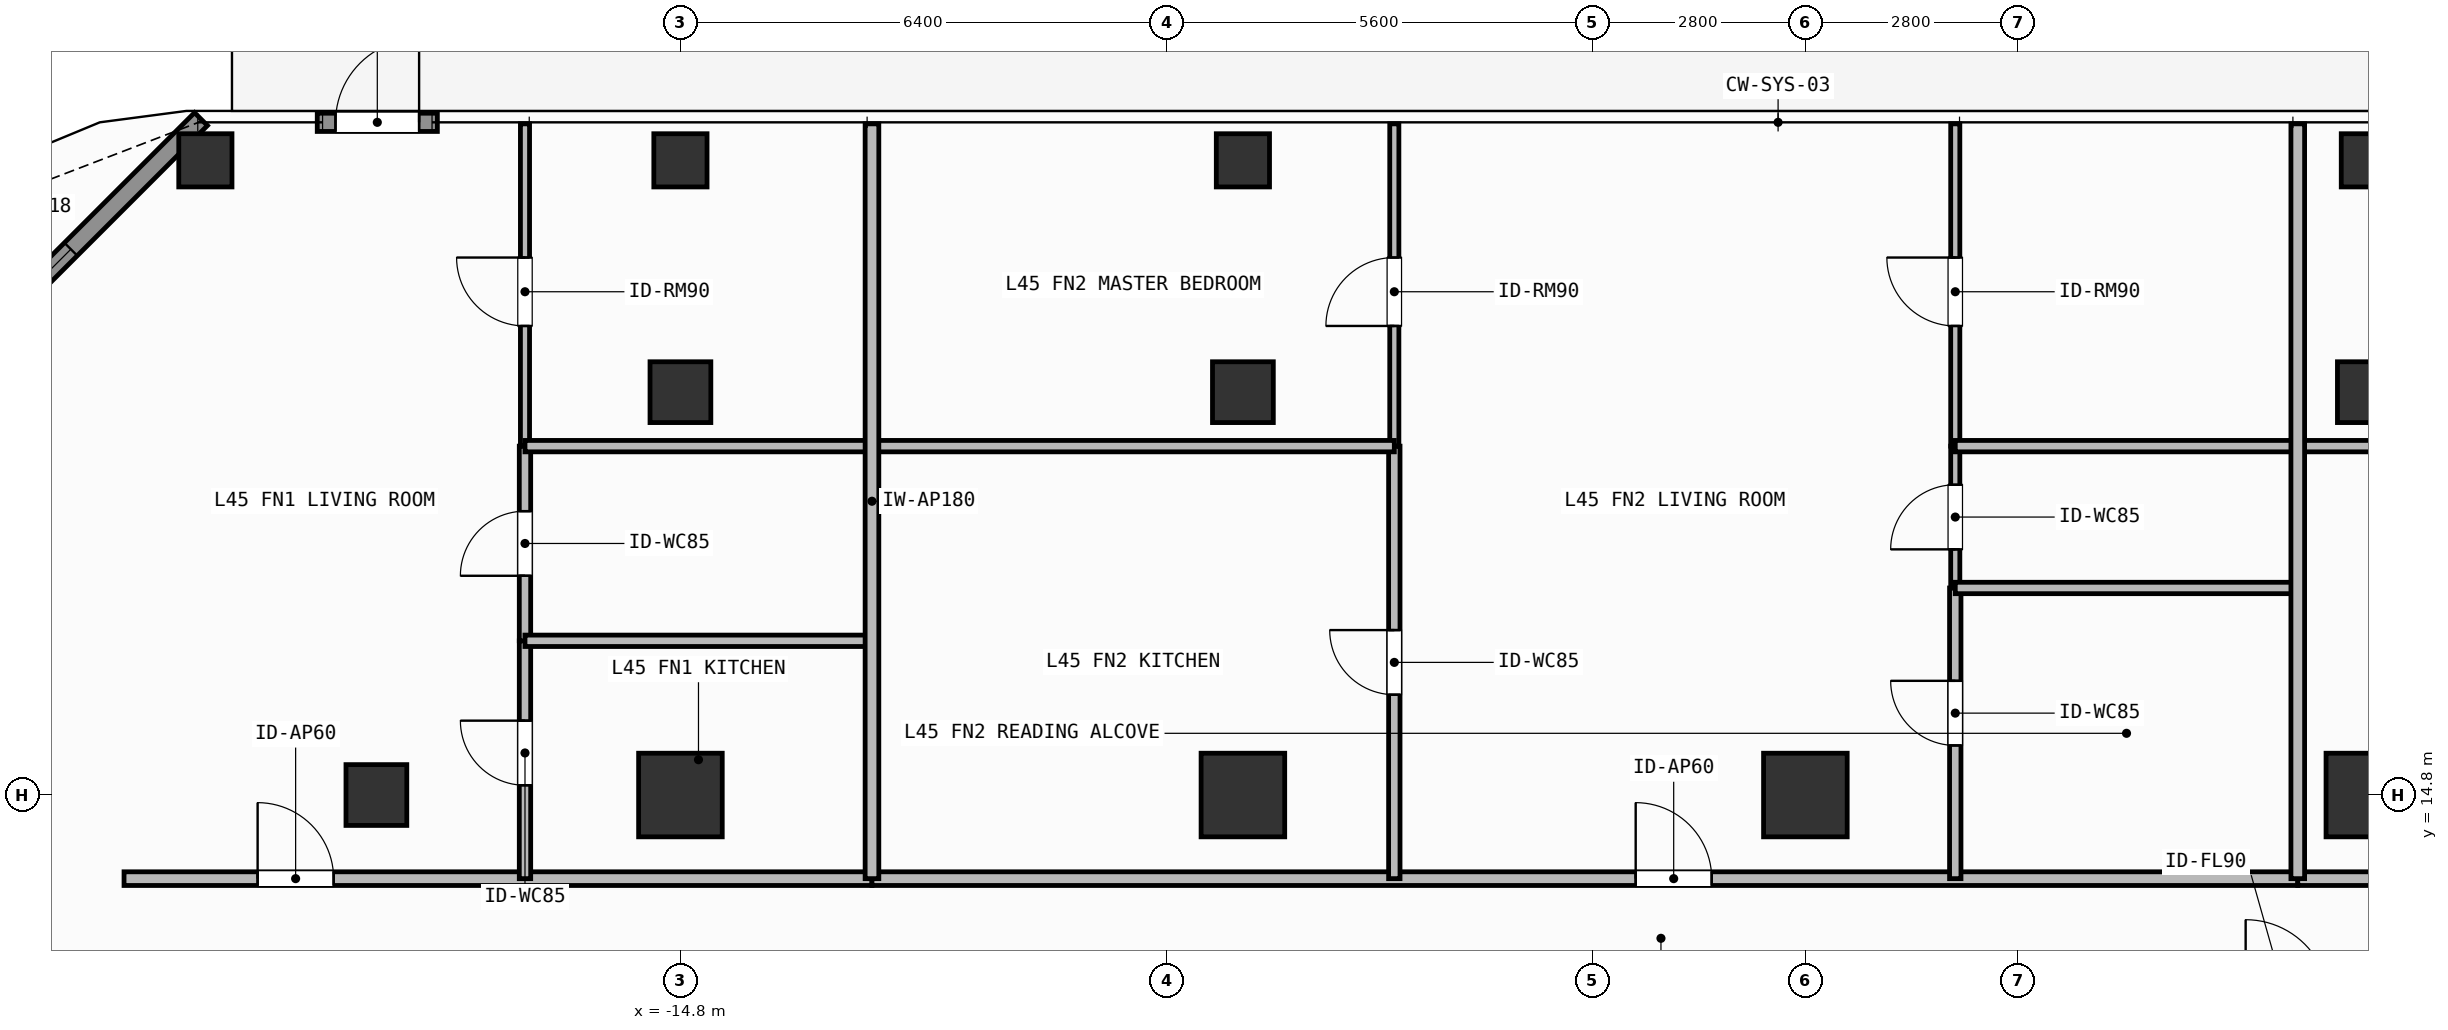
"""IFC4 building model, lengths in metres.
Left out: names, types, materials, properties, quantities, classifications, styles, units other than length and angle.
Written with IfcOpenShell. Run it as: python <this file> out.ifc"""

import sys

from ifc_helpers import new_model, si_unit, direction, frame, frame_2d, origin, origin_2d, place, context, subcontext, project, spatial, rectangle, hollow_rectangle, extrude, element, fill, save


model = new_model("IFC4")
c1 = context("Model", 3, precision=1e-05, world=origin(), true_north=direction((0.0, 1.0)))
c2 = subcontext(c1, "Body", "Model", "MODEL_VIEW")
j1 = project(units=[si_unit("LENGTHUNIT", "METRE"), si_unit("PLANEANGLEUNIT", "RADIAN")], contexts=[c1])
p1 = place(None, origin())
s1 = spatial("IfcSite", under=j1, at=p1, CompositionType="ELEMENT")
p2 = place(p1, origin())
s2 = spatial("IfcBuilding", under=s1, at=p2, CompositionType="ELEMENT")
p3 = place(p2, frame((0.0, 0.0, 183.6)))
s3 = spatial("IfcBuildingStorey", under=s2, at=p3, CompositionType="ELEMENT", Elevation=183.6)
for number, where, z_axis, x_axis in (
    (1, (-14.8, 14.8, 0.0), (0.0, 0.0, 1.0), (1.0, 0.0, 0.0)),
    (2, (-7.4, 14.8, 0.0), (0.0, 0.0, 1.0), (1.0, 0.0, 0.0)),
    (3, (0.0, 14.8, 0.0), (0.0, 0.0, 1.0), (1.0, 0.0, 0.0)),
    (4, (7.4, 14.8, 0.0), (0.0, 0.0, 1.0), (1.0, 0.0, 0.0)),
):
    element("IfcColumn", number, at=place(p3, frame(where, z_axis=z_axis, x_axis=x_axis)), inside=s3, PredefinedType="COLUMN", context=c2, shape_type="SweptSolid", body=[
        extrude(rectangle(XDim=1.1, YDim=1.1, at=origin_2d()), origin(), (0.0, 0.0, 1.0), 3.9),
    ])
for number, where, z_axis, x_axis in (
    (5, (-18.8, 14.8, 0.0), (0.0, 0.0, 1.0), (1.0, 0.0, 0.0)),
    (6, (-14.8, 20.1, 0.0), (0.0, 0.0, 1.0), (1.0, 0.0, 0.0)),
    (7, (-7.4, 20.1, 0.0), (0.0, 0.0, 1.0), (1.0, 0.0, 0.0)),
    (8, (7.4, 20.1, 0.0), (0.0, 0.0, 1.0), (1.0, 0.0, 0.0)),
):
    element("IfcColumn", number, at=place(p3, frame(where, z_axis=z_axis, x_axis=x_axis)), inside=s3, PredefinedType="COLUMN", context=c2, shape_type="SweptSolid", body=[
        extrude(hollow_rectangle(XDim=0.8, YDim=0.8, WallThickness=0.036, at=origin_2d()), origin(), (0.0, 0.0, 1.0), 3.9),
    ])
for number, where, z_axis, x_axis in (
    (9, (-21.05, 23.15, 0.0), (0.0, 0.0, 1.0), (1.0, 0.0, 0.0)),
    (10, (-14.8, 23.15, 0.0), (0.0, 0.0, 1.0), (1.0, 0.0, 0.0)),
    (11, (-7.4, 23.15, 0.0), (0.0, 0.0, 1.0), (1.0, 0.0, 0.0)),
    (12, (7.4, 23.15, 0.0), (0.0, 0.0, 1.0), (1.0, 0.0, 0.0)),
):
    element("IfcColumn", number, at=place(p3, frame(where, z_axis=z_axis, x_axis=x_axis)), inside=s3, PredefinedType="COLUMN", context=c2, shape_type="SweptSolid", body=[
        extrude(hollow_rectangle(XDim=0.7, YDim=0.7, WallThickness=0.032, at=origin_2d()), origin(), (0.0, 0.0, 1.0), 3.9),
    ])
p4 = place(p3, frame((-19.578, 23.65, 0.0), z_axis=(0.0, 0.0, 1.0), x_axis=(1.0, 0.0, 0.0)))
e13 = element("IfcWall", 13, at=p4, inside=s3, PredefinedType="SOLIDWALL", context=c2, shape_type="SweptSolid", body=[
    extrude(rectangle(XDim=1.58, YDim=0.24, at=frame_2d((0.79, 0.0))), origin(), (0.0, 0.0, 1.0), 3.68),
])
p5 = place(p4, frame((0.24, 0.0, 0.0)))
e14 = element("IfcOpeningElement", 14, at=p5, cuts=e13, PredefinedType="OPENING", context=c2, shape_type="SweptSolid", body=[
    extrude(rectangle(XDim=1.1, YDim=2.2, at=frame_2d((0.55, 1.1))), frame((0.0, 0.13, 0.0), z_axis=(0.0, -1.0, 0.0), x_axis=(1.0, 0.0, 0.0)), (0.0, 0.0, 1.0), 0.26),
])
p6 = place(p3, frame((-25.592, 19.208, 0.0), z_axis=(0.0, 0.0, 1.0), x_axis=(0.707087534163, 0.707126027686, 0.0)))
e15 = element("IfcWall", 15, at=p6, inside=s3, PredefinedType="SOLIDWALL", context=c2, shape_type="SweptSolid", body=[
    extrude(rectangle(XDim=6.342, YDim=0.24, at=frame_2d((3.171, 0.0))), origin(), (0.0, 0.0, 1.0), 3.68),
])
p7 = place(p6, frame((2.421, 0.0, 0.8)))
e16 = element("IfcOpeningElement", 16, at=p7, cuts=e15, PredefinedType="OPENING", context=c2, shape_type="SweptSolid", body=[
    extrude(rectangle(XDim=1.5, YDim=1.85, at=frame_2d((0.75, 0.925))), frame((0.0, 0.13, 0.0), z_axis=(0.0, -1.0, 0.0), x_axis=(1.0, 0.0, 0.0)), (0.0, 0.0, 1.0), 0.26),
])
p8 = place(p3, frame((-22.12, 13.7, 0.0), z_axis=(0.0, 0.0, 1.0), x_axis=(1.0, 0.0, 0.0)))
e17 = element("IfcWall", 17, at=p8, inside=s3, PredefinedType="PARTITIONING", context=c2, shape_type="SweptSolid", body=[
    extrude(rectangle(XDim=9.84, YDim=0.18, at=frame_2d((4.92, 0.0))), origin(), (0.0, 0.0, 1.0), 3.68),
])
p9 = place(p8, frame((1.758, 0.0, 0.0)))
e18 = element("IfcOpeningElement", 18, at=p9, cuts=e17, PredefinedType="OPENING", context=c2, shape_type="SweptSolid", body=[
    extrude(rectangle(XDim=1.0, YDim=2.2, at=frame_2d((0.5, 1.1))), frame((0.0, 0.1, 0.0), z_axis=(0.0, -1.0, 0.0), x_axis=(1.0, 0.0, 0.0)), (0.0, 0.0, 1.0), 0.2),
])
p10 = place(p3, frame((-16.845, 13.7, 0.0), z_axis=(0.0, 0.0, 1.0), x_axis=(0.0, 1.0, 0.0)))
e19 = element("IfcWall", 19, at=p10, inside=s3, PredefinedType="PARTITIONING", context=c2, shape_type="SweptSolid", body=[
    extrude(rectangle(XDim=3.129, YDim=0.15, at=frame_2d((1.564, 0.0))), origin(), (0.0, 0.0, 1.0), 3.68),
])
p11 = place(p10, frame((1.229, 0.0, 0.0)))
e20 = element("IfcOpeningElement", 20, at=p11, cuts=e19, PredefinedType="OPENING", context=c2, shape_type="SweptSolid", body=[
    extrude(rectangle(XDim=0.85, YDim=2.1, at=frame_2d((0.425, 1.05))), frame((0.0, 0.085, 0.0), z_axis=(0.0, -1.0, 0.0), x_axis=(1.0, 0.0, 0.0)), (0.0, 0.0, 1.0), 0.17),
])
p12 = place(p3, frame((-16.845, 16.829, 0.0), z_axis=(0.0, 0.0, 1.0), x_axis=(0.0, 1.0, 0.0)))
e21 = element("IfcWall", 21, at=p12, inside=s3, PredefinedType="PARTITIONING", context=c2, shape_type="SweptSolid", body=[
    extrude(rectangle(XDim=2.561, YDim=0.15, at=frame_2d((1.28, 0.0))), origin(), (0.0, 0.0, 1.0), 3.68),
])
p13 = place(p12, frame((0.855, 0.0, 0.0)))
e22 = element("IfcOpeningElement", 22, at=p13, cuts=e21, PredefinedType="OPENING", context=c2, shape_type="SweptSolid", body=[
    extrude(rectangle(XDim=0.85, YDim=2.1, at=frame_2d((0.425, 1.05))), frame((0.0, 0.085, 0.0), z_axis=(0.0, -1.0, 0.0), x_axis=(1.0, 0.0, 0.0)), (0.0, 0.0, 1.0), 0.17),
])
p14 = place(p3, frame((-16.845, 19.39, 0.0), z_axis=(0.0, 0.0, 1.0), x_axis=(0.0, 1.0, 0.0)))
e23 = element("IfcWall", 23, at=p14, inside=s3, PredefinedType="PARTITIONING", context=c2, shape_type="SweptSolid", body=[
    extrude(rectangle(XDim=4.24, YDim=0.12, at=frame_2d((2.12, 0.0))), origin(), (0.0, 0.0, 1.0), 3.68),
])
p15 = place(p14, frame((1.581, 0.0, 0.0)))
e24 = element("IfcOpeningElement", 24, at=p15, cuts=e23, PredefinedType="OPENING", context=c2, shape_type="SweptSolid", body=[
    extrude(rectangle(XDim=0.9, YDim=2.1, at=frame_2d((0.45, 1.05))), frame((0.0, 0.07, 0.0), z_axis=(0.0, -1.0, 0.0), x_axis=(1.0, 0.0, 0.0)), (0.0, 0.0, 1.0), 0.14),
])
p16 = place(p3, frame((-12.28, 13.7, 0.0), z_axis=(0.0, 0.0, 1.0), x_axis=(1.0, 0.0, 0.0)))
e25 = element("IfcWall", 25, at=p16, inside=s3, PredefinedType="PARTITIONING", context=c2, shape_type="SweptSolid", body=[
    extrude(rectangle(XDim=18.758, YDim=0.18, at=frame_2d((9.379, 0.0))), origin(), (0.0, 0.0, 1.0), 3.68),
])
p17 = place(p16, frame((10.048, 0.0, 0.0)))
e26 = element("IfcOpeningElement", 26, at=p17, cuts=e25, PredefinedType="OPENING", context=c2, shape_type="SweptSolid", body=[
    extrude(rectangle(XDim=1.0, YDim=2.2, at=frame_2d((0.5, 1.1))), frame((0.0, 0.1, 0.0), z_axis=(0.0, -1.0, 0.0), x_axis=(1.0, 0.0, 0.0)), (0.0, 0.0, 1.0), 0.2),
])
p18 = place(p3, frame((-5.408, 13.7, 0.0), z_axis=(0.0, 0.0, 1.0), x_axis=(0.0, 1.0, 0.0)))
e27 = element("IfcWall", 27, at=p18, inside=s3, PredefinedType="PARTITIONING", context=c2, shape_type="SweptSolid", body=[
    extrude(rectangle(XDim=5.69, YDim=0.15, at=frame_2d((2.845, 0.0))), origin(), (0.0, 0.0, 1.0), 3.68),
])
p19 = place(p18, frame((2.42, 0.0, 0.0)))
e28 = element("IfcOpeningElement", 28, at=p19, cuts=e27, PredefinedType="OPENING", context=c2, shape_type="SweptSolid", body=[
    extrude(rectangle(XDim=0.85, YDim=2.1, at=frame_2d((0.425, 1.05))), frame((0.0, 0.085, 0.0), z_axis=(0.0, -1.0, 0.0), x_axis=(1.0, 0.0, 0.0)), (0.0, 0.0, 1.0), 0.17),
])
p20 = place(p3, frame((-5.408, 19.39, 0.0), z_axis=(0.0, 0.0, 1.0), x_axis=(0.0, 1.0, 0.0)))
e29 = element("IfcWall", 29, at=p20, inside=s3, PredefinedType="PARTITIONING", context=c2, shape_type="SweptSolid", body=[
    extrude(rectangle(XDim=4.24, YDim=0.12, at=frame_2d((2.12, 0.0))), origin(), (0.0, 0.0, 1.0), 3.68),
])
p21 = place(p20, frame((1.581, 0.0, 0.0)))
e30 = element("IfcOpeningElement", 30, at=p21, cuts=e29, PredefinedType="OPENING", context=c2, shape_type="SweptSolid", body=[
    extrude(rectangle(XDim=0.9, YDim=2.1, at=frame_2d((0.45, 1.05))), frame((0.0, 0.07, 0.0), z_axis=(0.0, -1.0, 0.0), x_axis=(1.0, 0.0, 0.0)), (0.0, 0.0, 1.0), 0.14),
])
p22 = place(p3, frame((1.972, 13.7, 0.0), z_axis=(0.0, 0.0, 1.0), x_axis=(0.0, 1.0, 0.0)))
e31 = element("IfcWall", 31, at=p22, inside=s3, PredefinedType="PARTITIONING", context=c2, shape_type="SweptSolid", body=[
    extrude(rectangle(XDim=3.824, YDim=0.15, at=frame_2d((1.912, 0.0))), origin(), (0.0, 0.0, 1.0), 3.68),
])
p23 = place(p22, frame((1.752, 0.0, 0.0)))
e32 = element("IfcOpeningElement", 32, at=p23, cuts=e31, PredefinedType="OPENING", context=c2, shape_type="SweptSolid", body=[
    extrude(rectangle(XDim=0.85, YDim=2.1, at=frame_2d((0.425, 1.05))), frame((0.0, 0.085, 0.0), z_axis=(0.0, -1.0, 0.0), x_axis=(1.0, 0.0, 0.0)), (0.0, 0.0, 1.0), 0.17),
])
p24 = place(p3, frame((1.972, 17.524, 0.0), z_axis=(0.0, 0.0, 1.0), x_axis=(0.0, 1.0, 0.0)))
e33 = element("IfcWall", 33, at=p24, inside=s3, PredefinedType="PARTITIONING", context=c2, shape_type="SweptSolid", body=[
    extrude(rectangle(XDim=1.866, YDim=0.12, at=frame_2d((0.933, 0.0))), origin(), (0.0, 0.0, 1.0), 3.68),
])
p25 = place(p24, frame((0.508, 0.0, 0.0)))
e34 = element("IfcOpeningElement", 34, at=p25, cuts=e33, PredefinedType="OPENING", context=c2, shape_type="SweptSolid", body=[
    extrude(rectangle(XDim=0.85, YDim=2.1, at=frame_2d((0.425, 1.05))), frame((0.0, 0.07, 0.0), z_axis=(0.0, -1.0, 0.0), x_axis=(1.0, 0.0, 0.0)), (0.0, 0.0, 1.0), 0.14),
])
p26 = place(p3, frame((1.972, 19.39, 0.0), z_axis=(0.0, 0.0, 1.0), x_axis=(0.0, 1.0, 0.0)))
e35 = element("IfcWall", 35, at=p26, inside=s3, PredefinedType="PARTITIONING", context=c2, shape_type="SweptSolid", body=[
    extrude(rectangle(XDim=4.24, YDim=0.12, at=frame_2d((2.12, 0.0))), origin(), (0.0, 0.0, 1.0), 3.68),
])
p27 = place(p26, frame((1.581, 0.0, 0.0)))
e36 = element("IfcOpeningElement", 36, at=p27, cuts=e35, PredefinedType="OPENING", context=c2, shape_type="SweptSolid", body=[
    extrude(rectangle(XDim=0.9, YDim=2.1, at=frame_2d((0.45, 1.05))), frame((0.0, 0.07, 0.0), z_axis=(0.0, -1.0, 0.0), x_axis=(1.0, 0.0, 0.0)), (0.0, 0.0, 1.0), 0.14),
])
p28 = place(p3, frame((6.478, 13.7, 0.0), z_axis=(0.0, 0.0, 1.0), x_axis=(1.0, 0.0, 0.0)))
e37 = element("IfcWall", 37, at=p28, inside=s3, PredefinedType="PARTITIONING", context=c2, shape_type="SweptSolid", body=[
    extrude(rectangle(XDim=11.842, YDim=0.18, at=frame_2d((5.921, 0.0))), origin(), (0.0, 0.0, 1.0), 3.68),
])
p29 = place(p28, frame((5.154, 0.0, 0.0)))
e38 = element("IfcOpeningElement", 38, at=p29, cuts=e37, PredefinedType="OPENING", context=c2, shape_type="SweptSolid", body=[
    extrude(rectangle(XDim=1.0, YDim=2.2, at=frame_2d((0.5, 1.1))), frame((0.0, 0.1, 0.0), z_axis=(0.0, -1.0, 0.0), x_axis=(1.0, 0.0, 0.0)), (0.0, 0.0, 1.0), 0.2),
])
for number, where, z_axis, x_axis in (
    (39, (-16.845, 16.829, 0.0), (0.0, 0.0, 1.0), (1.0, 0.0, 0.0)),
    (40, (-16.845, 19.39, 0.0), (0.0, 0.0, 1.0), (1.0, 0.0, 0.0)),
):
    element("IfcWall", number, at=place(p3, frame(where, z_axis=z_axis, x_axis=x_axis)), inside=s3, PredefinedType="PARTITIONING", context=c2, shape_type="SweptSolid", body=[
        extrude(rectangle(XDim=4.565, YDim=0.15, at=frame_2d((2.282, 0.0))), origin(), (0.0, 0.0, 1.0), 3.68),
    ])
p30 = place(p3, frame((-12.28, 19.39, 0.0), z_axis=(0.0, 0.0, 1.0), x_axis=(1.0, 0.0, 0.0)))
e41 = element("IfcWall", 41, at=p30, inside=s3, PredefinedType="PARTITIONING", context=c2, shape_type="SweptSolid", body=[
    extrude(rectangle(XDim=6.872, YDim=0.15, at=frame_2d((3.436, 0.0))), origin(), (0.0, 0.0, 1.0), 3.68),
])
for number, where, z_axis, x_axis in (
    (42, (1.972, 17.524, 0.0), (0.0, 0.0, 1.0), (1.0, 0.0, 0.0)),
    (43, (1.972, 19.39, 0.0), (0.0, 0.0, 1.0), (1.0, 0.0, 0.0)),
):
    element("IfcWall", number, at=place(p3, frame(where, z_axis=z_axis, x_axis=x_axis)), inside=s3, PredefinedType="PARTITIONING", context=c2, shape_type="SweptSolid", body=[
        extrude(rectangle(XDim=4.506, YDim=0.15, at=frame_2d((2.253, 0.0))), origin(), (0.0, 0.0, 1.0), 3.68),
    ])
p31 = place(p3, frame((-12.28, 13.7, 0.0), z_axis=(0.0, 0.0, 1.0), x_axis=(0.0, 1.0, 0.0)))
e44 = element("IfcWall", 44, at=p31, inside=s3, PredefinedType="PARTITIONING", context=c2, shape_type="SweptSolid", body=[
    extrude(rectangle(XDim=9.93, YDim=0.18, at=frame_2d((4.965, 0.0))), origin(), (0.0, 0.0, 1.0), 3.68),
])
p32 = place(p3, frame((6.478, 19.39, 0.0), z_axis=(0.0, 0.0, 1.0), x_axis=(1.0, 0.0, 0.0)))
e45 = element("IfcWall", 45, at=p32, inside=s3, PredefinedType="PARTITIONING", context=c2, shape_type="SweptSolid", body=[
    extrude(rectangle(XDim=4.003, YDim=0.15, at=frame_2d((2.001, 0.0))), origin(), (0.0, 0.0, 1.0), 3.68),
])
p33 = place(p3, frame((6.478, 13.7, 0.0), z_axis=(0.0, 0.0, 1.0), x_axis=(0.0, 1.0, 0.0)))
e46 = element("IfcWall", 46, at=p33, inside=s3, PredefinedType="PARTITIONING", context=c2, shape_type="SweptSolid", body=[
    extrude(rectangle(XDim=9.93, YDim=0.18, at=frame_2d((4.965, 0.0))), origin(), (0.0, 0.0, 1.0), 3.68),
])
p34 = place(p5, origin())
e47 = element("IfcDoor", 47, at=p34, inside=s3, OperationType="SINGLE_SWING_RIGHT", PredefinedType="DOOR", context=c2, shape_type="SweptSolid", body=[
    extrude(rectangle(XDim=1.1, YDim=2.2, at=frame_2d((0.55, 1.1))), frame((0.0, 0.025, 0.0), z_axis=(0.0, -1.0, 0.0), x_axis=(1.0, 0.0, 0.0)), (0.0, 0.0, 1.0), 0.05),
])
fill(e14, e47)
p35 = place(p7, origin())
e48 = element("IfcWindow", 48, at=p35, inside=s3, PartitioningType="SINGLE_PANEL", PredefinedType="WINDOW", context=c2, shape_type="SweptSolid", body=[
    extrude(rectangle(XDim=1.5, YDim=1.85, at=frame_2d((0.75, 0.925))), frame((0.0, 0.03, 0.0), z_axis=(0.0, -1.0, 0.0), x_axis=(1.0, 0.0, 0.0)), (0.0, 0.0, 1.0), 0.06),
])
fill(e16, e48)
p36 = place(p9, origin())
e49 = element("IfcDoor", 49, at=p36, inside=s3, OperationType="SINGLE_SWING_LEFT", PredefinedType="DOOR", context=c2, shape_type="SweptSolid", body=[
    extrude(rectangle(XDim=1.0, YDim=2.2, at=frame_2d((0.5, 1.1))), frame((0.0, 0.025, 0.0), z_axis=(0.0, -1.0, 0.0), x_axis=(1.0, 0.0, 0.0)), (0.0, 0.0, 1.0), 0.05),
])
fill(e18, e49)
p37 = place(p11, origin())
e50 = element("IfcDoor", 50, at=p37, inside=s3, OperationType="SINGLE_SWING_RIGHT", PredefinedType="DOOR", context=c2, shape_type="SweptSolid", body=[
    extrude(rectangle(XDim=0.85, YDim=2.1, at=frame_2d((0.425, 1.05))), frame((0.0, 0.025, 0.0), z_axis=(0.0, -1.0, 0.0), x_axis=(1.0, 0.0, 0.0)), (0.0, 0.0, 1.0), 0.05),
])
fill(e20, e50)
p38 = place(p13, origin())
e51 = element("IfcDoor", 51, at=p38, inside=s3, OperationType="SINGLE_SWING_LEFT", PredefinedType="DOOR", context=c2, shape_type="SweptSolid", body=[
    extrude(rectangle(XDim=0.85, YDim=2.1, at=frame_2d((0.425, 1.05))), frame((0.0, 0.025, 0.0), z_axis=(0.0, -1.0, 0.0), x_axis=(1.0, 0.0, 0.0)), (0.0, 0.0, 1.0), 0.05),
])
fill(e22, e51)
p39 = place(p15, origin())
e52 = element("IfcDoor", 52, at=p39, inside=s3, OperationType="SINGLE_SWING_RIGHT", PredefinedType="DOOR", context=c2, shape_type="SweptSolid", body=[
    extrude(rectangle(XDim=0.9, YDim=2.1, at=frame_2d((0.45, 1.05))), frame((0.0, 0.025, 0.0), z_axis=(0.0, -1.0, 0.0), x_axis=(1.0, 0.0, 0.0)), (0.0, 0.0, 1.0), 0.05),
])
fill(e24, e52)
p40 = place(p17, origin())
e53 = element("IfcDoor", 53, at=p40, inside=s3, OperationType="SINGLE_SWING_LEFT", PredefinedType="DOOR", context=c2, shape_type="SweptSolid", body=[
    extrude(rectangle(XDim=1.0, YDim=2.2, at=frame_2d((0.5, 1.1))), frame((0.0, 0.025, 0.0), z_axis=(0.0, -1.0, 0.0), x_axis=(1.0, 0.0, 0.0)), (0.0, 0.0, 1.0), 0.05),
])
fill(e26, e53)
p41 = place(p19, origin())
e54 = element("IfcDoor", 54, at=p41, inside=s3, OperationType="SINGLE_SWING_RIGHT", PredefinedType="DOOR", context=c2, shape_type="SweptSolid", body=[
    extrude(rectangle(XDim=0.85, YDim=2.1, at=frame_2d((0.425, 1.05))), frame((0.0, 0.025, 0.0), z_axis=(0.0, -1.0, 0.0), x_axis=(1.0, 0.0, 0.0)), (0.0, 0.0, 1.0), 0.05),
])
fill(e28, e54)
p42 = place(p21, origin())
e55 = element("IfcDoor", 55, at=p42, inside=s3, OperationType="SINGLE_SWING_LEFT", PredefinedType="DOOR", context=c2, shape_type="SweptSolid", body=[
    extrude(rectangle(XDim=0.9, YDim=2.1, at=frame_2d((0.45, 1.05))), frame((0.0, 0.025, 0.0), z_axis=(0.0, -1.0, 0.0), x_axis=(1.0, 0.0, 0.0)), (0.0, 0.0, 1.0), 0.05),
])
fill(e30, e55)
p43 = place(p23, origin())
e56 = element("IfcDoor", 56, at=p43, inside=s3, OperationType="SINGLE_SWING_RIGHT", PredefinedType="DOOR", context=c2, shape_type="SweptSolid", body=[
    extrude(rectangle(XDim=0.85, YDim=2.1, at=frame_2d((0.425, 1.05))), frame((0.0, 0.025, 0.0), z_axis=(0.0, -1.0, 0.0), x_axis=(1.0, 0.0, 0.0)), (0.0, 0.0, 1.0), 0.05),
])
fill(e32, e56)
p44 = place(p25, origin())
e57 = element("IfcDoor", 57, at=p44, inside=s3, OperationType="SINGLE_SWING_LEFT", PredefinedType="DOOR", context=c2, shape_type="SweptSolid", body=[
    extrude(rectangle(XDim=0.85, YDim=2.1, at=frame_2d((0.425, 1.05))), frame((0.0, 0.025, 0.0), z_axis=(0.0, -1.0, 0.0), x_axis=(1.0, 0.0, 0.0)), (0.0, 0.0, 1.0), 0.05),
])
fill(e34, e57)
p45 = place(p27, origin())
e58 = element("IfcDoor", 58, at=p45, inside=s3, OperationType="SINGLE_SWING_RIGHT", PredefinedType="DOOR", context=c2, shape_type="SweptSolid", body=[
    extrude(rectangle(XDim=0.9, YDim=2.1, at=frame_2d((0.45, 1.05))), frame((0.0, 0.025, 0.0), z_axis=(0.0, -1.0, 0.0), x_axis=(1.0, 0.0, 0.0)), (0.0, 0.0, 1.0), 0.05),
])
fill(e36, e58)
save(model, sys.argv[1])
